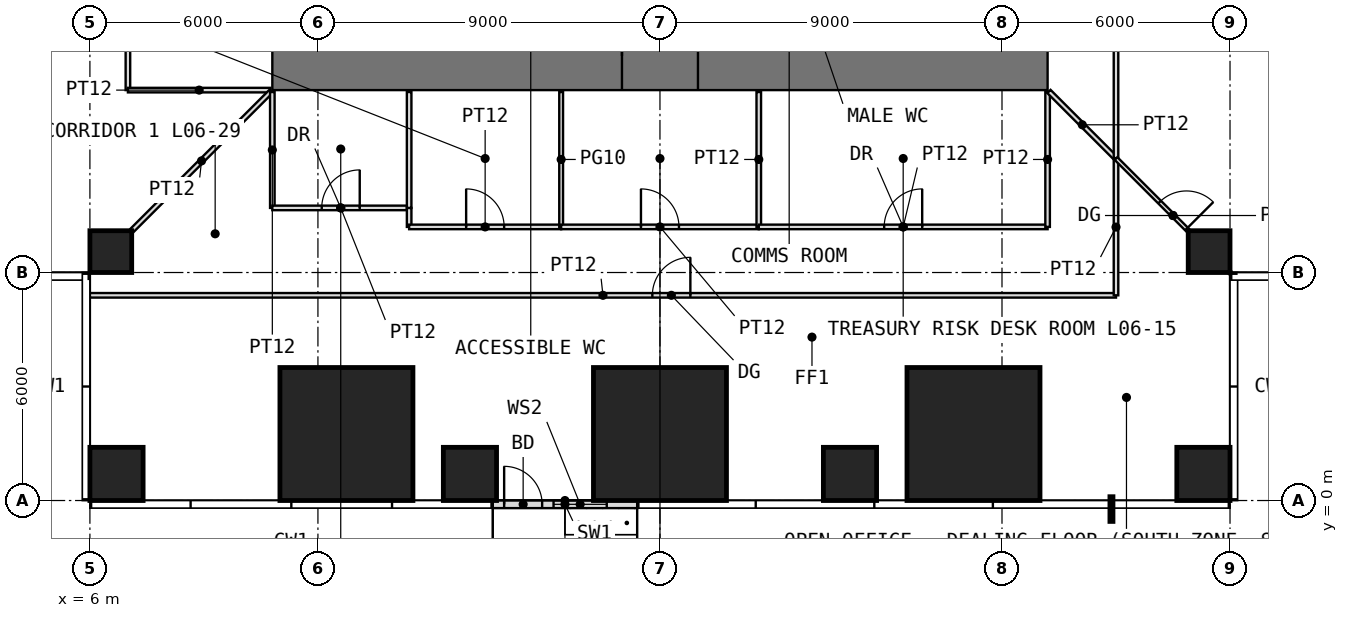
"""IFC4 building model, lengths in metres.
Left out: names, types, materials, properties, quantities, classifications, styles, units other than length and angle.
Written with IfcOpenShell. Run it as: python <this file> out.ifc"""

import sys

from ifc_helpers import new_model, si_unit, direction, frame, frame_2d, origin, origin_2d, place, context, subcontext, project, spatial, rectangle, extrude, element, fill, save


model = new_model("IFC4")
c1 = context("Model", 3, precision=1e-05, world=origin(), true_north=direction((0.0, 1.0)))
c2 = subcontext(c1, "Body", "Model", "MODEL_VIEW")
j1 = project(units=[si_unit("LENGTHUNIT", "METRE"), si_unit("PLANEANGLEUNIT", "RADIAN")], contexts=[c1])
p1 = place(None, origin())
s1 = spatial("IfcSite", under=j1, at=p1, CompositionType="ELEMENT")
p2 = place(p1, origin())
s2 = spatial("IfcBuilding", under=s1, at=p2, CompositionType="ELEMENT")
p3 = place(p2, frame((0.0, 0.0, 30.5)))
s3 = spatial("IfcBuildingStorey", under=s2, at=p3, CompositionType="ELEMENT", Elevation=30.5)
p4 = place(p3, frame((6.7, 0.7, 0.0), z_axis=(0.0, 0.0, 1.0), x_axis=(1.0, 0.0, 0.0)))
e1 = element("IfcColumn", 1, at=p4, inside=s3, PredefinedType="COLUMN", context=c2, shape_type="SweptSolid", body=[
    extrude(rectangle(XDim=1.4, YDim=1.4, at=origin_2d()), origin(), (0.0, 0.0, 1.0), 4.0),
])
p5 = place(p3, frame((12.75, 1.75, 0.0), z_axis=(0.0, 0.0, 1.0), x_axis=(1.0, 0.0, 0.0)))
e2 = element("IfcColumn", 2, at=p5, inside=s3, PredefinedType="COLUMN", context=c2, shape_type="SweptSolid", body=[
    extrude(rectangle(XDim=3.5, YDim=3.5, at=origin_2d()), origin(), (0.0, 0.0, 1.0), 4.0),
])
p6 = place(p3, frame((16.0, 0.7, 0.0), z_axis=(0.0, 0.0, 1.0), x_axis=(1.0, 0.0, 0.0)))
e3 = element("IfcColumn", 3, at=p6, inside=s3, PredefinedType="COLUMN", context=c2, shape_type="SweptSolid", body=[
    extrude(rectangle(XDim=1.4, YDim=1.4, at=origin_2d()), origin(), (0.0, 0.0, 1.0), 4.0),
])
p7 = place(p3, frame((21.0, 1.75, 0.0), z_axis=(0.0, 0.0, 1.0), x_axis=(1.0, 0.0, 0.0)))
e4 = element("IfcColumn", 4, at=p7, inside=s3, PredefinedType="COLUMN", context=c2, shape_type="SweptSolid", body=[
    extrude(rectangle(XDim=3.5, YDim=3.5, at=origin_2d()), origin(), (0.0, 0.0, 1.0), 4.0),
])
p8 = place(p3, frame((26.0, 0.7, 0.0), z_axis=(0.0, 0.0, 1.0), x_axis=(1.0, 0.0, 0.0)))
e5 = element("IfcColumn", 5, at=p8, inside=s3, PredefinedType="COLUMN", context=c2, shape_type="SweptSolid", body=[
    extrude(rectangle(XDim=1.4, YDim=1.4, at=origin_2d()), origin(), (0.0, 0.0, 1.0), 4.0),
])
p9 = place(p3, frame((29.25, 1.75, 0.0), z_axis=(0.0, 0.0, 1.0), x_axis=(1.0, 0.0, 0.0)))
e6 = element("IfcColumn", 6, at=p9, inside=s3, PredefinedType="COLUMN", context=c2, shape_type="SweptSolid", body=[
    extrude(rectangle(XDim=3.5, YDim=3.5, at=origin_2d()), origin(), (0.0, 0.0, 1.0), 4.0),
])
p10 = place(p3, frame((35.3, 0.7, 0.0), z_axis=(0.0, 0.0, 1.0), x_axis=(1.0, 0.0, 0.0)))
e7 = element("IfcColumn", 7, at=p10, inside=s3, PredefinedType="COLUMN", context=c2, shape_type="SweptSolid", body=[
    extrude(rectangle(XDim=1.4, YDim=1.4, at=origin_2d()), origin(), (0.0, 0.0, 1.0), 4.0),
])
for number, where, z_axis, x_axis in (
    (8, (6.55, 6.55, 0.0), (0.0, 0.0, 1.0), (1.0, 0.0, 0.0)),
    (9, (35.45, 6.55, 0.0), (0.0, 0.0, 1.0), (1.0, 0.0, 0.0)),
):
    element("IfcColumn", number, at=place(p3, frame(where, z_axis=z_axis, x_axis=x_axis)), inside=s3, PredefinedType="COLUMN", context=c2, shape_type="SweptSolid", body=[
        extrude(rectangle(XDim=1.1, YDim=1.1, at=origin_2d()), origin(), (0.0, 0.0, 1.0), 4.0),
    ])
p11 = place(p3, frame((16.6, -0.1, 0.0), z_axis=(0.0, 0.0, 1.0), x_axis=(1.0, 0.0, 0.0)))
e10 = element("IfcWall", 10, at=p11, inside=s3, PredefinedType="USERDEFINED", context=c2, shape_type="SweptSolid", body=[
    extrude(rectangle(XDim=3.8, YDim=0.2, at=frame_2d((1.9, 0.0))), origin(), (0.0, 0.0, 1.0), 3.75),
])
p12 = place(p11, frame((0.3, 0.0, 0.0)))
e11 = element("IfcOpeningElement", 11, at=p12, cuts=e10, PredefinedType="OPENING", context=c2, shape_type="SweptSolid", body=[
    extrude(rectangle(XDim=1.0, YDim=2.4, at=frame_2d((0.5, 1.2))), frame((0.0, 0.11, 0.0), z_axis=(0.0, -1.0, 0.0), x_axis=(1.0, 0.0, 0.0)), (0.0, 0.0, 1.0), 0.22),
])
p13 = place(p11, frame((1.6, 0.0, 0.3)))
e12 = element("IfcOpeningElement", 12, at=p13, cuts=e10, PredefinedType="OPENING", context=c2, shape_type="SweptSolid", body=[
    extrude(rectangle(XDim=1.4, YDim=2.7, at=frame_2d((0.7, 1.35))), frame((0.0, 0.11, 0.0), z_axis=(0.0, -1.0, 0.0), x_axis=(1.0, 0.0, 0.0)), (0.0, 0.0, 1.0), 0.22),
])
p14 = place(p3, frame((10.8, 11.7, -0.05), z_axis=(0.0, 0.0, 1.0), x_axis=(1.0, 0.0, 0.0)))
e13 = element("IfcWall", 13, at=p14, inside=s3, PredefinedType="SHEAR", context=c2, shape_type="SweptSolid", body=[
    extrude(rectangle(XDim=20.4, YDim=1.8, at=frame_2d((10.2, 0.0))), origin(), (0.0, 0.0, 1.0), 4.0),
])
p15 = place(p14, frame((9.2, 0.0, 0.05)))
e14 = element("IfcOpeningElement", 14, at=p15, cuts=e13, PredefinedType="OPENING", context=c2, shape_type="SweptSolid", body=[
    extrude(rectangle(XDim=2.0, YDim=2.2, at=frame_2d((1.0, 1.1))), frame((0.0, 0.91, 0.0), z_axis=(0.0, -1.0, 0.0), x_axis=(1.0, 0.0, 0.0)), (0.0, 0.0, 1.0), 1.82),
])
p16 = place(p3, frame((6.0, 5.4, 0.0), z_axis=(0.0, 0.0, 1.0), x_axis=(1.0, 0.0, 0.0)))
e15 = element("IfcWall", 15, at=p16, inside=s3, PredefinedType="PARTITIONING", context=c2, shape_type="SweptSolid", body=[
    extrude(rectangle(XDim=27.0, YDim=0.12, at=frame_2d((13.5, 0.0))), origin(), (0.0, 0.0, 1.0), 3.75),
])
p17 = place(p16, frame((14.8, 0.0, 0.0)))
e16 = element("IfcOpeningElement", 16, at=p17, cuts=e15, PredefinedType="OPENING", context=c2, shape_type="SweptSolid", body=[
    extrude(rectangle(XDim=1.0, YDim=2.4, at=frame_2d((0.5, 1.2))), frame((0.0, 0.07, 0.0), z_axis=(0.0, -1.0, 0.0), x_axis=(1.0, 0.0, 0.0)), (0.0, 0.0, 1.0), 0.14),
])
p18 = place(p3, frame((7.0, 10.8, 0.0), z_axis=(0.0, 0.0, 1.0), x_axis=(0.0, 1.0, 0.0)))
e17 = element("IfcWall", 17, at=p18, inside=s3, PredefinedType="PARTITIONING", context=c2, shape_type="SweptSolid", body=[
    extrude(rectangle(XDim=5.0, YDim=0.12, at=frame_2d((2.5, 0.0))), origin(), (0.0, 0.0, 1.0), 3.75),
])
p19 = place(p18, frame((2.0, 0.0, 0.0)))
e18 = element("IfcOpeningElement", 18, at=p19, cuts=e17, PredefinedType="OPENING", context=c2, shape_type="SweptSolid", body=[
    extrude(rectangle(XDim=1.0, YDim=2.2, at=frame_2d((0.5, 1.1))), frame((0.0, 0.07, 0.0), z_axis=(0.0, -1.0, 0.0), x_axis=(1.0, 0.0, 0.0)), (0.0, 0.0, 1.0), 0.14),
])
p20 = place(p3, frame((7.0, 10.8, 0.0), z_axis=(0.0, 0.0, 1.0), x_axis=(1.0, 0.0, 0.0)))
e19 = element("IfcWall", 19, at=p20, inside=s3, PredefinedType="PARTITIONING", context=c2, shape_type="SweptSolid", body=[
    extrude(rectangle(XDim=3.75, YDim=0.12, at=frame_2d((1.875, 0.0))), origin(), (0.0, 0.0, 1.0), 3.75),
])
p21 = place(p3, frame((7.11, 7.11, 0.0), z_axis=(0.0, 0.0, 1.0), x_axis=(0.707106781187, 0.707106781187, 0.0)))
e20 = element("IfcWall", 20, at=p21, inside=s3, PredefinedType="PARTITIONING", context=c2, shape_type="SweptSolid", body=[
    extrude(rectangle(XDim=5.168, YDim=0.12, at=frame_2d((2.584, 0.0))), origin(), (0.0, 0.0, 1.0), 3.75),
])
p22 = place(p3, frame((10.8, 7.7, 0.0), z_axis=(0.0, 0.0, 1.0), x_axis=(0.0, 1.0, 0.0)))
e21 = element("IfcWall", 21, at=p22, inside=s3, PredefinedType="PARTITIONING", context=c2, shape_type="SweptSolid", body=[
    extrude(rectangle(XDim=3.05, YDim=0.12, at=frame_2d((1.525, 0.0))), origin(), (0.0, 0.0, 1.0), 3.75),
])
p23 = place(p3, frame((10.8, 7.7, 0.0), z_axis=(0.0, 0.0, 1.0), x_axis=(1.0, 0.0, 0.0)))
e22 = element("IfcWall", 22, at=p23, inside=s3, PredefinedType="PARTITIONING", context=c2, shape_type="SweptSolid", body=[
    extrude(rectangle(XDim=3.6, YDim=0.12, at=frame_2d((1.8, 0.0))), origin(), (0.0, 0.0, 1.0), 3.75),
])
p24 = place(p23, frame((1.3, 0.0, 0.0)))
e23 = element("IfcOpeningElement", 23, at=p24, cuts=e22, PredefinedType="OPENING", context=c2, shape_type="SweptSolid", body=[
    extrude(rectangle(XDim=1.0, YDim=2.2, at=frame_2d((0.5, 1.1))), frame((0.0, 0.07, 0.0), z_axis=(0.0, -1.0, 0.0), x_axis=(1.0, 0.0, 0.0)), (0.0, 0.0, 1.0), 0.14),
])
p25 = place(p3, frame((14.4, 7.2, 0.0), z_axis=(0.0, 0.0, 1.0), x_axis=(0.0, 1.0, 0.0)))
e24 = element("IfcWall", 24, at=p25, inside=s3, PredefinedType="PARTITIONING", context=c2, shape_type="SweptSolid", body=[
    extrude(rectangle(XDim=0.5, YDim=0.12, at=frame_2d((0.25, 0.0))), origin(), (0.0, 0.0, 1.0), 3.75),
])
p26 = place(p3, frame((14.4, 7.2, 0.0), z_axis=(0.0, 0.0, 1.0), x_axis=(1.0, 0.0, 0.0)))
e25 = element("IfcWall", 25, at=p26, inside=s3, PredefinedType="PARTITIONING", context=c2, shape_type="SweptSolid", body=[
    extrude(rectangle(XDim=4.0, YDim=0.12, at=frame_2d((2.0, 0.0))), origin(), (0.0, 0.0, 1.0), 3.75),
])
p27 = place(p26, frame((1.5, 0.0, 0.0)))
e26 = element("IfcOpeningElement", 26, at=p27, cuts=e25, PredefinedType="OPENING", context=c2, shape_type="SweptSolid", body=[
    extrude(rectangle(XDim=1.0, YDim=2.4, at=frame_2d((0.5, 1.2))), frame((0.0, 0.07, 0.0), z_axis=(0.0, -1.0, 0.0), x_axis=(1.0, 0.0, 0.0)), (0.0, 0.0, 1.0), 0.14),
])
p28 = place(p3, frame((14.4, 7.7, 0.0), z_axis=(0.0, 0.0, 1.0), x_axis=(0.0, 1.0, 0.0)))
e27 = element("IfcWall", 27, at=p28, inside=s3, PredefinedType="PARTITIONING", context=c2, shape_type="SweptSolid", body=[
    extrude(rectangle(XDim=3.05, YDim=0.12, at=frame_2d((1.525, 0.0))), origin(), (0.0, 0.0, 1.0), 3.75),
])
p29 = place(p3, frame((18.4, 7.2, 0.0), z_axis=(0.0, 0.0, 1.0), x_axis=(0.0, 1.0, 0.0)))
e28 = element("IfcWall", 28, at=p29, inside=s3, PredefinedType="PARTITIONING", context=c2, shape_type="SweptSolid", body=[
    extrude(rectangle(XDim=3.55, YDim=0.1, at=frame_2d((1.775, 0.0))), origin(), (0.0, 0.0, 1.0), 3.75),
])
p30 = place(p3, frame((18.4, 7.2, 0.0), z_axis=(0.0, 0.0, 1.0), x_axis=(1.0, 0.0, 0.0)))
e29 = element("IfcWall", 29, at=p30, inside=s3, PredefinedType="PARTITIONING", context=c2, shape_type="SweptSolid", body=[
    extrude(rectangle(XDim=5.2, YDim=0.12, at=frame_2d((2.6, 0.0))), origin(), (0.0, 0.0, 1.0), 3.75),
])
p31 = place(p30, frame((2.1, 0.0, 0.0)))
e30 = element("IfcOpeningElement", 30, at=p31, cuts=e29, PredefinedType="OPENING", context=c2, shape_type="SweptSolid", body=[
    extrude(rectangle(XDim=1.0, YDim=2.4, at=frame_2d((0.5, 1.2))), frame((0.0, 0.07, 0.0), z_axis=(0.0, -1.0, 0.0), x_axis=(1.0, 0.0, 0.0)), (0.0, 0.0, 1.0), 0.14),
])
p32 = place(p3, frame((23.6, 7.2, 0.0), z_axis=(0.0, 0.0, 1.0), x_axis=(0.0, 1.0, 0.0)))
e31 = element("IfcWall", 31, at=p32, inside=s3, PredefinedType="PARTITIONING", context=c2, shape_type="SweptSolid", body=[
    extrude(rectangle(XDim=3.55, YDim=0.12, at=frame_2d((1.775, 0.0))), origin(), (0.0, 0.0, 1.0), 3.75),
])
p33 = place(p3, frame((23.6, 7.2, 0.0), z_axis=(0.0, 0.0, 1.0), x_axis=(1.0, 0.0, 0.0)))
e32 = element("IfcWall", 32, at=p33, inside=s3, PredefinedType="PARTITIONING", context=c2, shape_type="SweptSolid", body=[
    extrude(rectangle(XDim=7.6, YDim=0.12, at=frame_2d((3.8, 0.0))), origin(), (0.0, 0.0, 1.0), 3.75),
])
p34 = place(p33, frame((3.3, 0.0, 0.0)))
e33 = element("IfcOpeningElement", 33, at=p34, cuts=e32, PredefinedType="OPENING", context=c2, shape_type="SweptSolid", body=[
    extrude(rectangle(XDim=1.0, YDim=2.2, at=frame_2d((0.5, 1.1))), frame((0.0, 0.07, 0.0), z_axis=(0.0, -1.0, 0.0), x_axis=(1.0, 0.0, 0.0)), (0.0, 0.0, 1.0), 0.14),
])
p35 = place(p3, frame((31.2, 7.2, 0.0), z_axis=(0.0, 0.0, 1.0), x_axis=(0.0, 1.0, 0.0)))
e34 = element("IfcWall", 34, at=p35, inside=s3, PredefinedType="PARTITIONING", context=c2, shape_type="SweptSolid", body=[
    extrude(rectangle(XDim=3.55, YDim=0.12, at=frame_2d((1.775, 0.0))), origin(), (0.0, 0.0, 1.0), 3.75),
])
p36 = place(p3, frame((31.235, 10.765, 0.0), z_axis=(0.0, 0.0, 1.0), x_axis=(0.707106781187, -0.707106781187, 0.0)))
e35 = element("IfcWall", 35, at=p36, inside=s3, PredefinedType="PARTITIONING", context=c2, shape_type="SweptSolid", body=[
    extrude(rectangle(XDim=2.481, YDim=0.12, at=frame_2d((1.241, 0.0))), origin(), (0.0, 0.0, 1.0), 3.75),
])
p37 = place(p3, frame((33.0, 5.4, 0.0), z_axis=(0.0, 0.0, 1.0), x_axis=(0.0, 1.0, 0.0)))
e36 = element("IfcWall", 36, at=p37, inside=s3, PredefinedType="PARTITIONING", context=c2, shape_type="SweptSolid", body=[
    extrude(rectangle(XDim=3.59, YDim=0.12, at=frame_2d((1.795, 0.0))), origin(), (0.0, 0.0, 1.0), 3.75),
])
p38 = place(p3, frame((33.0, 9.01, 0.0), z_axis=(0.0, 0.0, 1.0), x_axis=(0.0, 1.0, 0.0)))
e37 = element("IfcWall", 37, at=p38, inside=s3, PredefinedType="PARTITIONING", context=c2, shape_type="SweptSolid", body=[
    extrude(rectangle(XDim=23.98, YDim=0.12, at=frame_2d((11.99, 0.0))), origin(), (0.0, 0.0, 1.0), 3.75),
])
p39 = place(p38, frame((11.49, 0.0, 0.0)))
e38 = element("IfcOpeningElement", 38, at=p39, cuts=e37, PredefinedType="OPENING", context=c2, shape_type="SweptSolid", body=[
    extrude(rectangle(XDim=1.0, YDim=2.4, at=frame_2d((0.5, 1.2))), frame((0.0, 0.07, 0.0), z_axis=(0.0, -1.0, 0.0), x_axis=(1.0, 0.0, 0.0)), (0.0, 0.0, 1.0), 0.14),
])
p40 = place(p3, frame((33.0, 9.0, 0.0), z_axis=(0.0, 0.0, 1.0), x_axis=(0.707106781187, -0.707106781187, 0.0)))
e39 = element("IfcWall", 39, at=p40, inside=s3, PredefinedType="PARTITIONING", context=c2, shape_type="SweptSolid", body=[
    extrude(rectangle(XDim=4.243, YDim=0.1, at=frame_2d((2.121, 0.0))), origin(), (0.0, 0.0, 1.0), 3.75),
])
p41 = place(p40, frame((1.621, 0.0, 0.0)))
e40 = element("IfcOpeningElement", 40, at=p41, cuts=e39, PredefinedType="OPENING", context=c2, shape_type="SweptSolid", body=[
    extrude(rectangle(XDim=1.0, YDim=2.4, at=frame_2d((0.5, 1.2))), frame((0.0, 0.06, 0.0), z_axis=(0.0, -1.0, 0.0), x_axis=(1.0, 0.0, 0.0)), (0.0, 0.0, 1.0), 0.12),
])
p42 = place(p12, origin())
e41 = element("IfcDoor", 41, at=p42, inside=s3, OperationType="SINGLE_SWING_LEFT", PredefinedType="DOOR", context=c2, shape_type="SweptSolid", body=[
    extrude(rectangle(XDim=1.0, YDim=2.4, at=frame_2d((0.5, 1.2))), frame((0.0, 0.025, 0.0), z_axis=(0.0, -1.0, 0.0), x_axis=(1.0, 0.0, 0.0)), (0.0, 0.0, 1.0), 0.05),
])
fill(e11, e41)
p43 = place(p13, origin())
e42 = element("IfcWindow", 42, at=p43, inside=s3, PartitioningType="SINGLE_PANEL", PredefinedType="WINDOW", context=c2, shape_type="SweptSolid", body=[
    extrude(rectangle(XDim=1.4, YDim=2.7, at=frame_2d((0.7, 1.35))), frame((0.0, 0.03, 0.0), z_axis=(0.0, -1.0, 0.0), x_axis=(1.0, 0.0, 0.0)), (0.0, 0.0, 1.0), 0.06),
])
fill(e12, e42)
p44 = place(p15, origin())
e43 = element("IfcDoor", 43, at=p44, inside=s3, OperationType="DOUBLE_DOOR_SINGLE_SWING", PredefinedType="DOOR", context=c2, shape_type="SweptSolid", body=[
    extrude(rectangle(XDim=2.0, YDim=2.2, at=frame_2d((1.0, 1.1))), frame((0.0, 0.025, 0.0), z_axis=(0.0, -1.0, 0.0), x_axis=(1.0, 0.0, 0.0)), (0.0, 0.0, 1.0), 0.05),
])
fill(e14, e43)
p45 = place(p24, origin())
e44 = element("IfcDoor", 44, at=p45, inside=s3, OperationType="SINGLE_SWING_RIGHT", PredefinedType="DOOR", context=c2, shape_type="SweptSolid", body=[
    extrude(rectangle(XDim=1.0, YDim=2.2, at=frame_2d((0.5, 1.1))), frame((0.0, 0.025, 0.0), z_axis=(0.0, -1.0, 0.0), x_axis=(1.0, 0.0, 0.0)), (0.0, 0.0, 1.0), 0.05),
])
fill(e23, e44)
p46 = place(p27, origin())
e45 = element("IfcDoor", 45, at=p46, inside=s3, OperationType="SINGLE_SWING_LEFT", PredefinedType="DOOR", context=c2, shape_type="SweptSolid", body=[
    extrude(rectangle(XDim=1.0, YDim=2.4, at=frame_2d((0.5, 1.2))), frame((0.0, 0.025, 0.0), z_axis=(0.0, -1.0, 0.0), x_axis=(1.0, 0.0, 0.0)), (0.0, 0.0, 1.0), 0.05),
])
fill(e26, e45)
p47 = place(p34, origin())
e46 = element("IfcDoor", 46, at=p47, inside=s3, OperationType="SINGLE_SWING_RIGHT", PredefinedType="DOOR", context=c2, shape_type="SweptSolid", body=[
    extrude(rectangle(XDim=1.0, YDim=2.2, at=frame_2d((0.5, 1.1))), frame((0.0, 0.025, 0.0), z_axis=(0.0, -1.0, 0.0), x_axis=(1.0, 0.0, 0.0)), (0.0, 0.0, 1.0), 0.05),
])
fill(e33, e46)
p48 = place(p17, origin())
e47 = element("IfcDoor", 47, at=p48, inside=s3, OperationType="SINGLE_SWING_RIGHT", PredefinedType="DOOR", context=c2, shape_type="SweptSolid", body=[
    extrude(rectangle(XDim=1.0, YDim=2.4, at=frame_2d((0.5, 1.2))), frame((0.0, 0.025, 0.0), z_axis=(0.0, -1.0, 0.0), x_axis=(1.0, 0.0, 0.0)), (0.0, 0.0, 1.0), 0.05),
])
fill(e16, e47)
p49 = place(p31, origin())
e48 = element("IfcDoor", 48, at=p49, inside=s3, OperationType="SINGLE_SWING_LEFT", PredefinedType="DOOR", context=c2, shape_type="SweptSolid", body=[
    extrude(rectangle(XDim=1.0, YDim=2.4, at=frame_2d((0.5, 1.2))), frame((0.0, 0.025, 0.0), z_axis=(0.0, -1.0, 0.0), x_axis=(1.0, 0.0, 0.0)), (0.0, 0.0, 1.0), 0.05),
])
fill(e30, e48)
p50 = place(p41, origin())
e49 = element("IfcDoor", 49, at=p50, inside=s3, OperationType="SINGLE_SWING_RIGHT", PredefinedType="DOOR", context=c2, shape_type="SweptSolid", body=[
    extrude(rectangle(XDim=1.0, YDim=2.4, at=frame_2d((0.5, 1.2))), frame((0.0, 0.025, 0.0), z_axis=(0.0, -1.0, 0.0), x_axis=(1.0, 0.0, 0.0)), (0.0, 0.0, 1.0), 0.05),
])
fill(e40, e49)
save(model, sys.argv[1])
